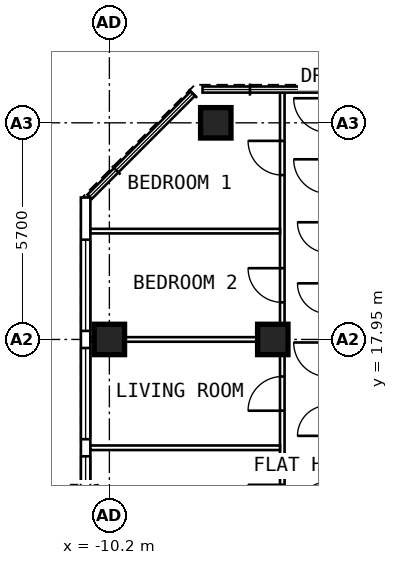
"""IFC4 building model, lengths in metres.
Left out: names, types, materials, properties, quantities, classifications, styles, units other than length and angle.
Written with IfcOpenShell. Run it as: python <this file> out.ifc"""

import sys

from ifc_helpers import new_model, si_unit, direction, frame, frame_2d, origin, origin_2d, place, context, subcontext, project, spatial, rectangle, extrude, element, fill, save


model = new_model("IFC4")
c1 = context("Model", 3, precision=1e-05, world=origin(), true_north=direction((0.0, 1.0)))
c2 = subcontext(c1, "Body", "Model", "MODEL_VIEW")
j1 = project(units=[si_unit("LENGTHUNIT", "METRE"), si_unit("PLANEANGLEUNIT", "RADIAN")], contexts=[c1])
p1 = place(None, origin())
s1 = spatial("IfcSite", under=j1, at=p1, CompositionType="ELEMENT")
p2 = place(p1, origin())
s2 = spatial("IfcBuilding", under=s1, at=p2, CompositionType="ELEMENT")
p3 = place(p2, frame((0.0, 0.0, 289.0)))
s3 = spatial("IfcBuildingStorey", under=s2, at=p3, CompositionType="ELEMENT", Elevation=289.0)
for number, where, z_axis, x_axis in (
    (1, (-10.2, 17.95, 0.0), (0.0, 0.0, 1.0), (0.0, 1.0, 0.0)),
    (2, (-7.4, 23.65, 0.0), (0.0, 0.0, 1.0), (0.0, 1.0, 0.0)),
    (3, (-5.9, 17.95, 0.0), (0.0, 0.0, 1.0), (0.0, 1.0, 0.0)),
):
    element("IfcColumn", number, at=place(p3, frame(where, z_axis=z_axis, x_axis=x_axis)), inside=s3, PredefinedType="COLUMN", context=c2, shape_type="SweptSolid", body=[
        extrude(rectangle(XDim=0.8, YDim=0.8, at=origin_2d()), origin(), (0.0, 0.0, 1.0), 3.6),
    ])
p4 = place(p3, frame((-10.825, 6.148, 0.0), z_axis=(0.0, 0.0, 1.0), x_axis=(0.0, 1.0, 0.0)))
e4 = element("IfcWall", 4, at=p4, inside=s3, PredefinedType="SOLIDWALL", context=c2, shape_type="SweptSolid", body=[
    extrude(rectangle(XDim=15.537, YDim=0.25, at=frame_2d((7.769, 0.0))), origin(), (0.0, 0.0, 1.0), 3.35),
])
p5 = place(p4, frame((0.627, 0.0, 0.6)))
e5 = element("IfcOpeningElement", 5, at=p5, cuts=e4, PredefinedType="OPENING", context=c2, shape_type="SweptSolid", body=[
    extrude(rectangle(XDim=2.4, YDim=2.0, at=frame_2d((1.2, 1.0))), frame((0.0, 0.137, 0.0), z_axis=(0.0, -1.0, 0.0), x_axis=(1.0, 0.0, 0.0)), (0.0, 0.0, 1.0), 0.274),
])
p6 = place(p4, frame((3.477, 0.0, 0.6)))
e6 = element("IfcOpeningElement", 6, at=p6, cuts=e4, PredefinedType="OPENING", context=c2, shape_type="SweptSolid", body=[
    extrude(rectangle(XDim=2.4, YDim=2.0, at=frame_2d((1.2, 1.0))), frame((0.0, 0.137, 0.0), z_axis=(0.0, -1.0, 0.0), x_axis=(1.0, 0.0, 0.0)), (0.0, 0.0, 1.0), 0.274),
])
p7 = place(p4, frame((6.327, 0.0, 0.6)))
e7 = element("IfcOpeningElement", 7, at=p7, cuts=e4, PredefinedType="OPENING", context=c2, shape_type="SweptSolid", body=[
    extrude(rectangle(XDim=2.4, YDim=2.0, at=frame_2d((1.2, 1.0))), frame((0.0, 0.137, 0.0), z_axis=(0.0, -1.0, 0.0), x_axis=(1.0, 0.0, 0.0)), (0.0, 0.0, 1.0), 0.274),
])
p8 = place(p4, frame((9.177, 0.0, 0.6)))
e8 = element("IfcOpeningElement", 8, at=p8, cuts=e4, PredefinedType="OPENING", context=c2, shape_type="SweptSolid", body=[
    extrude(rectangle(XDim=2.4, YDim=2.0, at=frame_2d((1.2, 1.0))), frame((0.0, 0.137, 0.0), z_axis=(0.0, -1.0, 0.0), x_axis=(1.0, 0.0, 0.0)), (0.0, 0.0, 1.0), 0.274),
])
p9 = place(p4, frame((12.027, 0.0, 0.6)))
e9 = element("IfcOpeningElement", 9, at=p9, cuts=e4, PredefinedType="OPENING", context=c2, shape_type="SweptSolid", body=[
    extrude(rectangle(XDim=2.4, YDim=2.0, at=frame_2d((1.2, 1.0))), frame((0.0, 0.137, 0.0), z_axis=(0.0, -1.0, 0.0), x_axis=(1.0, 0.0, 0.0)), (0.0, 0.0, 1.0), 0.274),
])
p10 = place(p3, frame((-5.65, 9.6, 0.0), z_axis=(0.0, 0.0, 1.0), x_axis=(0.0, 1.0, 0.0)))
e10 = element("IfcWall", 10, at=p10, inside=s3, PredefinedType="PARTITIONING", context=c2, shape_type="SweptSolid", body=[
    extrude(rectangle(XDim=14.845, YDim=0.12, at=frame_2d((7.422, 0.0))), origin(), (0.0, 0.0, 1.0), 3.35),
])
p11 = place(p10, frame((1.075, 0.0, 0.0)))
e11 = element("IfcOpeningElement", 11, at=p11, cuts=e10, PredefinedType="OPENING", context=c2, shape_type="SweptSolid", body=[
    extrude(rectangle(XDim=0.9, YDim=2.1, at=frame_2d((0.45, 1.05))), frame((0.0, 0.072, 0.0), z_axis=(0.0, -1.0, 0.0), x_axis=(1.0, 0.0, 0.0)), (0.0, 0.0, 1.0), 0.144),
])
p12 = place(p10, frame((3.625, 0.0, 0.0)))
e12 = element("IfcOpeningElement", 12, at=p12, cuts=e10, PredefinedType="OPENING", context=c2, shape_type="SweptSolid", body=[
    extrude(rectangle(XDim=0.9, YDim=2.1, at=frame_2d((0.45, 1.05))), frame((0.0, 0.072, 0.0), z_axis=(0.0, -1.0, 0.0), x_axis=(1.0, 0.0, 0.0)), (0.0, 0.0, 1.0), 0.144),
])
p13 = place(p10, frame((6.475, 0.0, 0.0)))
e13 = element("IfcOpeningElement", 13, at=p13, cuts=e10, PredefinedType="OPENING", context=c2, shape_type="SweptSolid", body=[
    extrude(rectangle(XDim=0.9, YDim=2.1, at=frame_2d((0.45, 1.05))), frame((0.0, 0.072, 0.0), z_axis=(0.0, -1.0, 0.0), x_axis=(1.0, 0.0, 0.0)), (0.0, 0.0, 1.0), 0.144),
])
p14 = place(p10, frame((9.325, 0.0, 0.0)))
e14 = element("IfcOpeningElement", 14, at=p14, cuts=e10, PredefinedType="OPENING", context=c2, shape_type="SweptSolid", body=[
    extrude(rectangle(XDim=0.9, YDim=2.1, at=frame_2d((0.45, 1.05))), frame((0.0, 0.072, 0.0), z_axis=(0.0, -1.0, 0.0), x_axis=(1.0, 0.0, 0.0)), (0.0, 0.0, 1.0), 0.144),
])
p15 = place(p10, frame((12.675, 0.0, 0.0)))
e15 = element("IfcOpeningElement", 15, at=p15, cuts=e10, PredefinedType="OPENING", context=c2, shape_type="SweptSolid", body=[
    extrude(rectangle(XDim=0.9, YDim=2.1, at=frame_2d((0.45, 1.05))), frame((0.0, 0.072, 0.0), z_axis=(0.0, -1.0, 0.0), x_axis=(1.0, 0.0, 0.0)), (0.0, 0.0, 1.0), 0.144),
])
p16 = place(p3, frame((-5.71, 15.1, 0.0), z_axis=(0.0, 0.0, 1.0), x_axis=(-1.0, 0.0, 0.0)))
e16 = element("IfcWall", 16, at=p16, inside=s3, PredefinedType="PARTITIONING", context=c2, shape_type="SweptSolid", body=[
    extrude(rectangle(XDim=4.99, YDim=0.12, at=frame_2d((2.495, 0.0))), origin(), (0.0, 0.0, 1.0), 3.35),
])
p17 = place(p3, frame((-5.71, 17.95, 0.0), z_axis=(0.0, 0.0, 1.0), x_axis=(-1.0, 0.0, 0.0)))
e17 = element("IfcWall", 17, at=p17, inside=s3, PredefinedType="PARTITIONING", context=c2, shape_type="SweptSolid", body=[
    extrude(rectangle(XDim=4.99, YDim=0.12, at=frame_2d((2.495, 0.0))), origin(), (0.0, 0.0, 1.0), 2.45),
])
p18 = place(p3, frame((-5.71, 20.8, 0.0), z_axis=(0.0, 0.0, 1.0), x_axis=(-1.0, 0.0, 0.0)))
e18 = element("IfcWall", 18, at=p18, inside=s3, PredefinedType="PARTITIONING", context=c2, shape_type="SweptSolid", body=[
    extrude(rectangle(XDim=4.99, YDim=0.12, at=frame_2d((2.495, 0.0))), origin(), (0.0, 0.0, 1.0), 3.35),
])
p19 = place(p7, origin())
e19 = element("IfcWindow", 19, at=p19, inside=s3, PartitioningType="SINGLE_PANEL", PredefinedType="WINDOW", context=c2, shape_type="SweptSolid", body=[
    extrude(rectangle(XDim=2.4, YDim=2.0, at=frame_2d((1.2, 1.0))), frame((0.0, 0.03, 0.0), z_axis=(0.0, -1.0, 0.0), x_axis=(1.0, 0.0, 0.0)), (0.0, 0.0, 1.0), 0.06),
])
fill(e7, e19)
p20 = place(p8, origin())
e20 = element("IfcWindow", 20, at=p20, inside=s3, PartitioningType="SINGLE_PANEL", PredefinedType="WINDOW", context=c2, shape_type="SweptSolid", body=[
    extrude(rectangle(XDim=2.4, YDim=2.0, at=frame_2d((1.2, 1.0))), frame((0.0, 0.03, 0.0), z_axis=(0.0, -1.0, 0.0), x_axis=(1.0, 0.0, 0.0)), (0.0, 0.0, 1.0), 0.06),
])
fill(e8, e20)
p21 = place(p9, origin())
e21 = element("IfcWindow", 21, at=p21, inside=s3, PartitioningType="SINGLE_PANEL", PredefinedType="WINDOW", context=c2, shape_type="SweptSolid", body=[
    extrude(rectangle(XDim=2.4, YDim=2.0, at=frame_2d((1.2, 1.0))), frame((0.0, 0.03, 0.0), z_axis=(0.0, -1.0, 0.0), x_axis=(1.0, 0.0, 0.0)), (0.0, 0.0, 1.0), 0.06),
])
fill(e9, e21)
p22 = place(p12, origin())
e22 = element("IfcDoor", 22, at=p22, inside=s3, OperationType="SINGLE_SWING_RIGHT", PredefinedType="DOOR", context=c2, shape_type="SweptSolid", body=[
    extrude(rectangle(XDim=0.9, YDim=2.1, at=frame_2d((0.45, 1.05))), frame((0.0, 0.025, 0.0), z_axis=(0.0, -1.0, 0.0), x_axis=(1.0, 0.0, 0.0)), (0.0, 0.0, 1.0), 0.05),
])
fill(e12, e22)
p23 = place(p13, origin())
e23 = element("IfcDoor", 23, at=p23, inside=s3, OperationType="SINGLE_SWING_LEFT", PredefinedType="DOOR", context=c2, shape_type="SweptSolid", body=[
    extrude(rectangle(XDim=0.9, YDim=2.1, at=frame_2d((0.45, 1.05))), frame((0.0, 0.025, 0.0), z_axis=(0.0, -1.0, 0.0), x_axis=(1.0, 0.0, 0.0)), (0.0, 0.0, 1.0), 0.05),
])
fill(e13, e23)
p24 = place(p14, origin())
e24 = element("IfcDoor", 24, at=p24, inside=s3, OperationType="SINGLE_SWING_RIGHT", PredefinedType="DOOR", context=c2, shape_type="SweptSolid", body=[
    extrude(rectangle(XDim=0.9, YDim=2.1, at=frame_2d((0.45, 1.05))), frame((0.0, 0.025, 0.0), z_axis=(0.0, -1.0, 0.0), x_axis=(1.0, 0.0, 0.0)), (0.0, 0.0, 1.0), 0.05),
])
fill(e14, e24)
p25 = place(p15, origin())
e25 = element("IfcDoor", 25, at=p25, inside=s3, OperationType="SINGLE_SWING_RIGHT", PredefinedType="DOOR", context=c2, shape_type="SweptSolid", body=[
    extrude(rectangle(XDim=0.9, YDim=2.1, at=frame_2d((0.45, 1.05))), frame((0.0, 0.025, 0.0), z_axis=(0.0, -1.0, 0.0), x_axis=(1.0, 0.0, 0.0)), (0.0, 0.0, 1.0), 0.05),
])
fill(e15, e25)
save(model, sys.argv[1])
